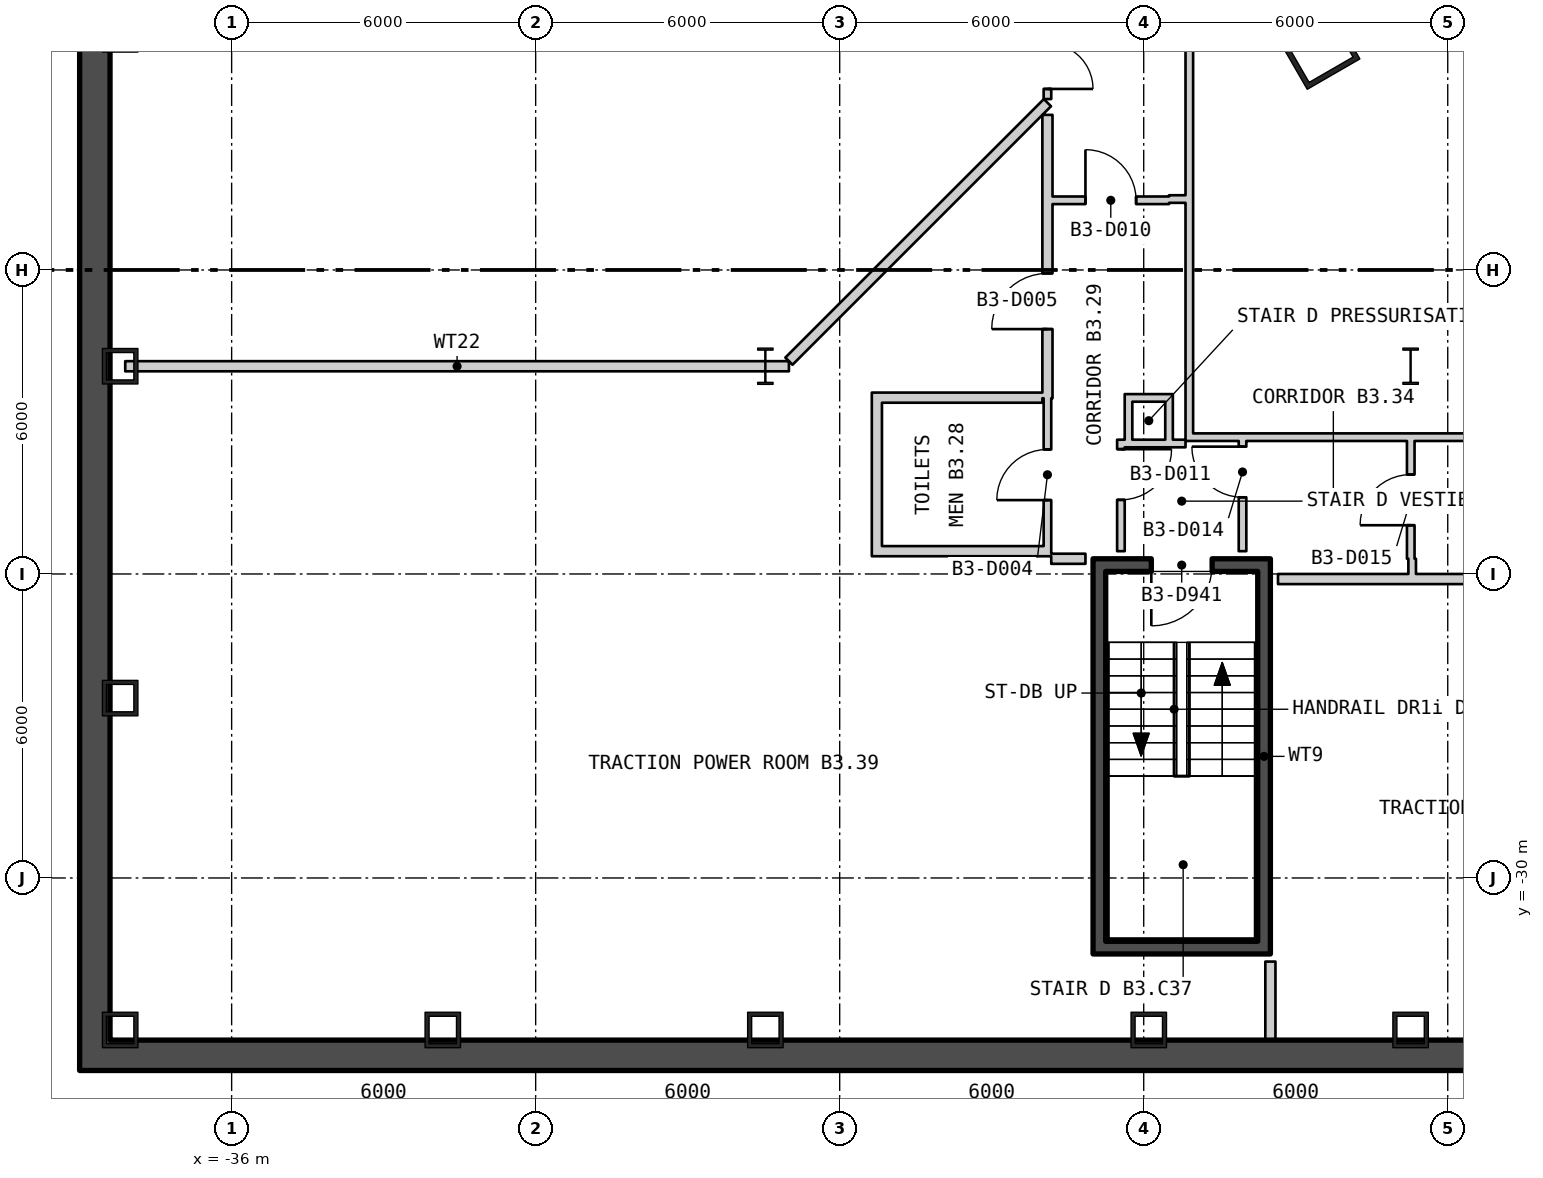
"""IFC4 building model, lengths in metres.
Left out: names, types, materials, properties, quantities, classifications, styles, units other than length and angle.
Written with IfcOpenShell. Run it as: python <this file> out.ifc"""

import sys

from ifc_helpers import new_model, si_unit, direction, frame, frame_2d, origin, origin_2d, place, context, subcontext, project, spatial, rectangle, hollow_rectangle, i_section, extrude, element, fill, save


model = new_model("IFC4")
c1 = context("Model", 3, precision=1e-05, world=origin(), true_north=direction((0.0, 1.0)))
c2 = subcontext(c1, "Body", "Model", "MODEL_VIEW")
j1 = project(units=[si_unit("LENGTHUNIT", "METRE"), si_unit("PLANEANGLEUNIT", "RADIAN")], contexts=[c1])
p1 = place(None, origin())
s1 = spatial("IfcSite", under=j1, at=p1, CompositionType="ELEMENT")
p2 = place(p1, origin())
s2 = spatial("IfcBuilding", under=s1, at=p2, CompositionType="ELEMENT")
p3 = place(p2, frame((0.0, 0.0, -16.8)))
s3 = spatial("IfcBuildingStorey", under=s2, at=p3, CompositionType="ELEMENT", Elevation=-16.8)
p4 = place(p3, frame((-14.553, -13.615, 0.0), z_axis=(0.0, 0.0, 1.0), x_axis=(0.5, -0.866025403784, 0.0)))
e1 = element("IfcColumn", 1, at=p4, inside=s3, PredefinedType="COLUMN", context=c2, shape_type="SweptSolid", body=[
    extrude(hollow_rectangle(XDim=1.2, YDim=1.2, WallThickness=0.1, at=origin_2d()), origin(), (0.0, 0.0, 1.0), 5.4),
])
for number, where, z_axis, x_axis in (
    (2, (-38.2, -19.9, 0.0), (0.0, 0.0, 1.0), (0.0, -1.0, 0.0)),
    (3, (-38.2, -26.45, 0.0), (0.0, 0.0, 1.0), (0.0, -1.0, 0.0)),
    (4, (-38.2, -33.0, 0.0), (0.0, 0.0, 1.0), (1.0, 0.0, 0.0)),
    (5, (-31.833, -33.0, 0.0), (0.0, 0.0, 1.0), (1.0, 0.0, 0.0)),
    (6, (-25.467, -33.0, 0.0), (0.0, 0.0, 1.0), (1.0, 0.0, 0.0)),
    (7, (-17.9, -33.0, 0.0), (0.0, 0.0, 1.0), (1.0, 0.0, 0.0)),
    (8, (-12.733, -33.0, 0.0), (0.0, 0.0, 1.0), (1.0, 0.0, 0.0)),
):
    element("IfcColumn", number, at=place(p3, frame(where, z_axis=z_axis, x_axis=x_axis)), inside=s3, PredefinedType="COLUMN", context=c2, shape_type="SweptSolid", body=[
        extrude(hollow_rectangle(XDim=0.7, YDim=0.7, WallThickness=0.08, at=origin_2d()), origin(), (0.0, 0.0, 1.0), 5.4),
    ])
for number, where, z_axis, x_axis in (
    (9, (-25.467, -19.9, 0.0), (0.0, 0.0, 1.0), (1.0, 0.0, 0.0)),
    (10, (-12.733, -19.9, 0.0), (0.0, 0.0, 1.0), (1.0, 0.0, 0.0)),
):
    element("IfcColumn", number, at=place(p3, frame(where, z_axis=z_axis, x_axis=x_axis)), inside=s3, PredefinedType="COLUMN", context=c2, shape_type="SweptSolid", body=[
        extrude(i_section(OverallWidth=0.304, OverallDepth=0.716, WebThickness=0.021, FlangeThickness=0.04, at=origin_2d()), origin(), (0.0, 0.0, 1.0), 5.4),
    ])
p5 = place(p3, frame((-39.0, -33.5, -0.4), z_axis=(0.0, 0.0, 1.0), x_axis=(1.0, 0.0, 0.0)))
e11 = element("IfcWall", 11, at=p5, inside=s3, PredefinedType="STANDARD", context=c2, shape_type="SweptSolid", body=[
    extrude(rectangle(XDim=78.0, YDim=0.6, at=frame_2d((39.0, 0.0))), origin(), (0.0, 0.0, 1.0), 5.4),
])
p6 = place(p3, frame((-38.7, -33.2, -0.4), z_axis=(0.0, 0.0, 1.0), x_axis=(0.0, 1.0, 0.0)))
e12 = element("IfcWall", 12, at=p6, inside=s3, PredefinedType="STANDARD", context=c2, shape_type="SweptSolid", body=[
    extrude(rectangle(XDim=52.8, YDim=0.6, at=frame_2d((26.4, 0.0))), origin(), (0.0, 0.0, 1.0), 5.4),
])
for number, where, z_axis, x_axis in (
    (13, (-18.875, -31.25, 0.0), (0.0, 0.0, 1.0), (0.0, 1.0, 0.0)),
    (14, (-15.625, -31.25, 0.0), (0.0, 0.0, 1.0), (0.0, 1.0, 0.0)),
):
    element("IfcWall", number, at=place(p3, frame(where, z_axis=z_axis, x_axis=x_axis)), inside=s3, PredefinedType="SHEAR", context=c2, shape_type="SweptSolid", body=[
        extrude(rectangle(XDim=7.3, YDim=0.25, at=frame_2d((3.65, 0.0))), origin(), (0.0, 0.0, 1.0), 4.95),
    ])
p7 = place(p3, frame((-19.0, -31.375, 0.0), z_axis=(0.0, 0.0, 1.0), x_axis=(1.0, 0.0, 0.0)))
e15 = element("IfcWall", 15, at=p7, inside=s3, PredefinedType="SHEAR", context=c2, shape_type="SweptSolid", body=[
    extrude(rectangle(XDim=3.5, YDim=0.25, at=frame_2d((1.75, 0.0))), origin(), (0.0, 0.0, 1.0), 4.95),
])
p8 = place(p3, frame((-19.0, -23.825, 0.0), z_axis=(0.0, 0.0, 1.0), x_axis=(1.0, 0.0, 0.0)))
e16 = element("IfcWall", 16, at=p8, inside=s3, PredefinedType="SHEAR", context=c2, shape_type="SweptSolid", body=[
    extrude(rectangle(XDim=3.5, YDim=0.25, at=frame_2d((1.75, 0.0))), origin(), (0.0, 0.0, 1.0), 4.95),
])
p9 = place(p8, frame((1.15, 0.0, 0.0)))
e17 = element("IfcOpeningElement", 17, at=p9, cuts=e16, PredefinedType="OPENING", context=c2, shape_type="SweptSolid", body=[
    extrude(rectangle(XDim=1.2, YDim=2.1, at=frame_2d((0.6, 1.05))), frame((0.0, 0.135, 0.0), z_axis=(0.0, -1.0, 0.0), x_axis=(1.0, 0.0, 0.0)), (0.0, 0.0, 1.0), 0.27),
])
p10 = place(p3, frame((-38.1, -19.9, 0.0), z_axis=(0.0, 0.0, 1.0), x_axis=(1.0, 0.0, 0.0)))
e18 = element("IfcWall", 18, at=p10, inside=s3, PredefinedType="PARTITIONING", context=c2, shape_type="SweptSolid", body=[
    extrude(rectangle(XDim=13.098, YDim=0.2, at=frame_2d((6.549, 0.0))), origin(), (0.0, 0.0, 1.0), 4.95),
])
p11 = place(p3, frame((-25.002, -19.8, 0.0), z_axis=(0.0, 0.0, 1.0), x_axis=(0.707106781187, 0.707106781187, 0.0)))
e19 = element("IfcWall", 19, at=p11, inside=s3, PredefinedType="PARTITIONING", context=c2, shape_type="SweptSolid", body=[
    extrude(rectangle(XDim=7.215, YDim=0.2, at=frame_2d((3.608, 0.0))), origin(), (0.0, 0.0, 1.0), 4.95),
])
p12 = place(p3, frame((-23.366, -23.55, 0.0), z_axis=(0.0, 0.0, 1.0), x_axis=(1.0, 0.0, 0.0)))
e20 = element("IfcWall", 20, at=p12, inside=s3, PredefinedType="PARTITIONING", context=c2, shape_type="SweptSolid", body=[
    extrude(rectangle(XDim=3.541, YDim=0.2, at=frame_2d((1.77, 0.0))), origin(), (0.0, 0.0, 1.0), 4.95),
])
p13 = place(p3, frame((-23.366, -20.52, 0.0), z_axis=(0.0, 0.0, 1.0), x_axis=(1.0, 0.0, 0.0)))
e21 = element("IfcWall", 21, at=p13, inside=s3, PredefinedType="PARTITIONING", context=c2, shape_type="SweptSolid", body=[
    extrude(rectangle(XDim=3.366, YDim=0.2, at=frame_2d((1.683, 0.0))), origin(), (0.0, 0.0, 1.0), 4.95),
])
p14 = place(p3, frame((-23.266, -23.45, 0.0), z_axis=(0.0, 0.0, 1.0), x_axis=(0.0, 1.0, 0.0)))
e22 = element("IfcWall", 22, at=p14, inside=s3, PredefinedType="PARTITIONING", context=c2, shape_type="SweptSolid", body=[
    extrude(rectangle(XDim=2.83, YDim=0.2, at=frame_2d((1.415, 0.0))), origin(), (0.0, 0.0, 1.0), 4.95),
])
p15 = place(p3, frame((-19.9, -23.45, 0.0), z_axis=(0.0, 0.0, 1.0), x_axis=(0.0, 1.0, 0.0)))
e23 = element("IfcWall", 23, at=p15, inside=s3, PredefinedType="PARTITIONING", context=c2, shape_type="SweptSolid", body=[
    extrude(rectangle(XDim=2.918, YDim=0.15, at=frame_2d((1.459, 0.0))), origin(), (0.0, 0.0, 1.0), 4.95),
])
p16 = place(p15, frame((0.908, 0.0, 0.0)))
e24 = element("IfcOpeningElement", 24, at=p16, cuts=e23, PredefinedType="OPENING", context=c2, shape_type="SweptSolid", body=[
    extrude(rectangle(XDim=1.0, YDim=2.1, at=frame_2d((0.5, 1.05))), frame((0.0, 0.085, 0.0), z_axis=(0.0, -1.0, 0.0), x_axis=(1.0, 0.0, 0.0)), (0.0, 0.0, 1.0), 0.17),
])
p17 = place(p3, frame((-19.9, -20.532, 0.0), z_axis=(0.0, 0.0, 1.0), x_axis=(0.0, 1.0, 0.0)))
e25 = element("IfcWall", 25, at=p17, inside=s3, PredefinedType="PARTITIONING", context=c2, shape_type="SweptSolid", body=[
    extrude(rectangle(XDim=5.593, YDim=0.2, at=frame_2d((2.796, 0.0))), origin(), (0.0, 0.0, 1.0), 4.95),
])
p18 = place(p17, frame((1.365, 0.0, 0.0)))
e26 = element("IfcOpeningElement", 26, at=p18, cuts=e25, PredefinedType="OPENING", context=c2, shape_type="SweptSolid", body=[
    extrude(rectangle(XDim=1.1, YDim=2.1, at=frame_2d((0.55, 1.05))), frame((0.0, 0.11, 0.0), z_axis=(0.0, -1.0, 0.0), x_axis=(1.0, 0.0, 0.0)), (0.0, 0.0, 1.0), 0.22),
])
p19 = place(p3, frame((-19.9, -14.627, 0.0), z_axis=(0.0, 0.0, 1.0), x_axis=(0.0, 1.0, 0.0)))
e27 = element("IfcWall", 27, at=p19, inside=s3, PredefinedType="PARTITIONING", context=c2, shape_type="SweptSolid", body=[
    extrude(rectangle(XDim=12.039, YDim=0.15, at=frame_2d((6.019, 0.0))), origin(), (0.0, 0.0, 1.0), 4.95),
])
p20 = place(p19, frame((0.2, 0.0, 0.0)))
e28 = element("IfcOpeningElement", 28, at=p20, cuts=e27, PredefinedType="OPENING", context=c2, shape_type="SweptSolid", body=[
    extrude(rectangle(XDim=1.8, YDim=2.1, at=frame_2d((0.9, 1.05))), frame((0.0, 0.085, 0.0), z_axis=(0.0, -1.0, 0.0), x_axis=(1.0, 0.0, 0.0)), (0.0, 0.0, 1.0), 0.17),
])
p21 = place(p19, frame((5.308, 0.0, 0.0)))
e29 = element("IfcOpeningElement", 29, at=p21, cuts=e27, PredefinedType="OPENING", context=c2, shape_type="SweptSolid", body=[
    extrude(rectangle(XDim=1.8, YDim=2.1, at=frame_2d((0.9, 1.05))), frame((0.0, 0.085, 0.0), z_axis=(0.0, -1.0, 0.0), x_axis=(1.0, 0.0, 0.0)), (0.0, 0.0, 1.0), 0.17),
])
p22 = place(p3, frame((-19.825, -23.7, 0.0), z_axis=(0.0, 0.0, 1.0), x_axis=(1.0, 0.0, 0.0)))
e30 = element("IfcWall", 30, at=p22, inside=s3, PredefinedType="PARTITIONING", context=c2, shape_type="SweptSolid", body=[
    extrude(rectangle(XDim=0.675, YDim=0.2, at=frame_2d((0.338, 0.0))), origin(), (0.0, 0.0, 1.0), 4.95),
])
p23 = place(p3, frame((-19.8, -16.625, 0.0), z_axis=(0.0, 0.0, 1.0), x_axis=(1.0, 0.0, 0.0)))
e31 = element("IfcWall", 31, at=p23, inside=s3, PredefinedType="PARTITIONING", context=c2, shape_type="SweptSolid", body=[
    extrude(rectangle(XDim=2.3, YDim=0.15, at=frame_2d((1.15, 0.0))), origin(), (0.0, 0.0, 1.0), 4.95),
])
p24 = place(p23, frame((0.65, 0.0, 0.0)))
e32 = element("IfcOpeningElement", 32, at=p24, cuts=e31, PredefinedType="OPENING", context=c2, shape_type="SweptSolid", body=[
    extrude(rectangle(XDim=1.0, YDim=2.1, at=frame_2d((0.5, 1.05))), frame((0.0, 0.085, 0.0), z_axis=(0.0, -1.0, 0.0), x_axis=(1.0, 0.0, 0.0)), (0.0, 0.0, 1.0), 0.17),
])
p25 = place(p3, frame((-18.45, -23.55, 0.0), z_axis=(0.0, 0.0, 1.0), x_axis=(0.0, 1.0, 0.0)))
e33 = element("IfcWall", 33, at=p25, inside=s3, PredefinedType="PARTITIONING", context=c2, shape_type="SweptSolid", body=[
    extrude(rectangle(XDim=2.2, YDim=0.15, at=frame_2d((1.1, 0.0))), origin(), (0.0, 0.0, 1.0), 4.95),
])
p26 = place(p25, frame((1.013, 0.0, 0.0)))
e34 = element("IfcOpeningElement", 34, at=p26, cuts=e33, PredefinedType="OPENING", context=c2, shape_type="SweptSolid", body=[
    extrude(rectangle(XDim=1.0, YDim=2.1, at=frame_2d((0.5, 1.05))), frame((0.0, 0.085, 0.0), z_axis=(0.0, -1.0, 0.0), x_axis=(1.0, 0.0, 0.0)), (0.0, 0.0, 1.0), 0.17),
])
p27 = place(p3, frame((-18.3, -21.5, 0.0), z_axis=(0.0, 0.0, 1.0), x_axis=(0.0, 1.0, 0.0)))
e35 = element("IfcWall", 35, at=p27, inside=s3, PredefinedType="PARTITIONING", context=c2, shape_type="SweptSolid", body=[
    extrude(rectangle(XDim=1.05, YDim=0.15, at=frame_2d((0.525, 0.0))), origin(), (0.0, 0.0, 1.0), 4.95),
])
for number, where, z_axis, x_axis in (
    (36, (-18.225, -21.425, 0.0), (0.0, 0.0, 1.0), (1.0, 0.0, 0.0)),
    (37, (-18.225, -20.525, 0.0), (0.0, 0.0, 1.0), (1.0, 0.0, 0.0)),
):
    element("IfcWall", number, at=place(p3, frame(where, z_axis=z_axis, x_axis=x_axis)), inside=s3, PredefinedType="PARTITIONING", context=c2, shape_type="SweptSolid", body=[
        extrude(rectangle(XDim=0.65, YDim=0.15, at=frame_2d((0.325, 0.0))), origin(), (0.0, 0.0, 1.0), 4.95),
    ])
p28 = place(p3, frame((-17.5, -21.5, 0.0), z_axis=(0.0, 0.0, 1.0), x_axis=(0.0, 1.0, 0.0)))
e38 = element("IfcWall", 38, at=p28, inside=s3, PredefinedType="PARTITIONING", context=c2, shape_type="SweptSolid", body=[
    extrude(rectangle(XDim=1.05, YDim=0.15, at=frame_2d((0.525, 0.0))), origin(), (0.0, 0.0, 1.0), 4.95),
])
p29 = place(p3, frame((-17.5, -16.6, 0.0), z_axis=(0.0, 0.0, 1.0), x_axis=(1.0, 0.0, 0.0)))
e39 = element("IfcWall", 39, at=p29, inside=s3, PredefinedType="PARTITIONING", context=c2, shape_type="SweptSolid", body=[
    extrude(rectangle(XDim=0.325, YDim=0.15, at=frame_2d((0.163, 0.0))), origin(), (0.0, 0.0, 1.0), 4.95),
])
p30 = place(p3, frame((-17.425, -21.425, 0.0), z_axis=(0.0, 0.0, 1.0), x_axis=(1.0, 0.0, 0.0)))
e40 = element("IfcWall", 40, at=p30, inside=s3, PredefinedType="PARTITIONING", context=c2, shape_type="SweptSolid", body=[
    extrude(rectangle(XDim=0.25, YDim=0.15, at=frame_2d((0.125, 0.0))), origin(), (0.0, 0.0, 1.0), 4.95),
])
p31 = place(p3, frame((-17.175, -21.3, 0.0), z_axis=(0.0, 0.0, 1.0), x_axis=(1.0, 0.0, 0.0)))
e41 = element("IfcWall", 41, at=p31, inside=s3, PredefinedType="PARTITIONING", context=c2, shape_type="SweptSolid", body=[
    extrude(rectangle(XDim=15.475, YDim=0.15, at=frame_2d((7.737, 0.0))), origin(), (0.0, 0.0, 1.0), 4.95),
])
p32 = place(p31, frame((8.393, 0.0, 0.0)))
e42 = element("IfcOpeningElement", 42, at=p32, cuts=e41, PredefinedType="OPENING", context=c2, shape_type="SweptSolid", body=[
    extrude(rectangle(XDim=1.8, YDim=2.1, at=frame_2d((0.9, 1.05))), frame((0.0, 0.085, 0.0), z_axis=(0.0, -1.0, 0.0), x_axis=(1.0, 0.0, 0.0)), (0.0, 0.0, 1.0), 0.17),
])
p33 = place(p3, frame((-17.1, -21.225, 0.0), z_axis=(0.0, 0.0, 1.0), x_axis=(0.0, 1.0, 0.0)))
e43 = element("IfcWall", 43, at=p33, inside=s3, PredefinedType="PARTITIONING", context=c2, shape_type="SweptSolid", body=[
    extrude(rectangle(XDim=14.326, YDim=0.15, at=frame_2d((7.163, 0.0))), origin(), (0.0, 0.0, 1.0), 4.95),
])
p34 = place(p3, frame((-16.05, -23.55, 0.0), z_axis=(0.0, 0.0, 1.0), x_axis=(0.0, 1.0, 0.0)))
e44 = element("IfcWall", 44, at=p34, inside=s3, PredefinedType="PARTITIONING", context=c2, shape_type="SweptSolid", body=[
    extrude(rectangle(XDim=2.175, YDim=0.15, at=frame_2d((1.087, 0.0))), origin(), (0.0, 0.0, 1.0), 4.95),
])
p35 = place(p34, frame((1.063, 0.0, 0.0)))
e45 = element("IfcOpeningElement", 45, at=p35, cuts=e44, PredefinedType="OPENING", context=c2, shape_type="SweptSolid", body=[
    extrude(rectangle(XDim=1.0, YDim=2.1, at=frame_2d((0.5, 1.05))), frame((0.0, 0.085, 0.0), z_axis=(0.0, -1.0, 0.0), x_axis=(1.0, 0.0, 0.0)), (0.0, 0.0, 1.0), 0.17),
])
p36 = place(p3, frame((-15.5, -33.35, 0.0), z_axis=(0.0, 0.0, 1.0), x_axis=(0.0, 1.0, 0.0)))
e46 = element("IfcWall", 46, at=p36, inside=s3, PredefinedType="PARTITIONING", context=c2, shape_type="SweptSolid", body=[
    extrude(rectangle(XDim=1.7, YDim=0.2, at=frame_2d((0.85, 0.0))), origin(), (0.0, 0.0, 1.0), 4.95),
])
p37 = place(p3, frame((-15.35, -24.1, 0.0), z_axis=(0.0, 0.0, 1.0), x_axis=(1.0, 0.0, 0.0)))
e47 = element("IfcWall", 47, at=p37, inside=s3, PredefinedType="PARTITIONING", context=c2, shape_type="SweptSolid", body=[
    extrude(rectangle(XDim=15.539, YDim=0.2, at=frame_2d((7.769, 0.0))), origin(), (0.0, 0.0, 1.0), 4.95),
])
p38 = place(p3, frame((-12.73, -23.7, 0.0), z_axis=(0.0, 0.0, 1.0), x_axis=(0.0, 1.0, 0.0)))
e48 = element("IfcWall", 48, at=p38, inside=s3, PredefinedType="PARTITIONING", context=c2, shape_type="SweptSolid", body=[
    extrude(rectangle(XDim=2.325, YDim=0.15, at=frame_2d((1.163, 0.0))), origin(), (0.0, 0.0, 1.0), 4.95),
])
p39 = place(p38, frame((0.662, 0.0, 0.0)))
e49 = element("IfcOpeningElement", 49, at=p39, cuts=e48, PredefinedType="OPENING", context=c2, shape_type="SweptSolid", body=[
    extrude(rectangle(XDim=1.0, YDim=2.1, at=frame_2d((0.5, 1.05))), frame((0.0, 0.085, 0.0), z_axis=(0.0, -1.0, 0.0), x_axis=(1.0, 0.0, 0.0)), (0.0, 0.0, 1.0), 0.17),
])
p40 = place(p3, frame((-12.702, -24.0, 0.0), z_axis=(0.0, 0.0, 1.0), x_axis=(0.0, 1.0, 0.0)))
e50 = element("IfcWall", 50, at=p40, inside=s3, PredefinedType="PARTITIONING", context=c2, shape_type="SweptSolid", body=[
    extrude(rectangle(XDim=0.3, YDim=0.15, at=frame_2d((0.15, 0.0))), origin(), (0.0, 0.0, 1.0), 4.95),
])
p41 = place(p9, origin())
e51 = element("IfcDoor", 51, at=p41, inside=s3, OperationType="SINGLE_SWING_LEFT", PredefinedType="DOOR", context=c2, shape_type="SweptSolid", body=[
    extrude(rectangle(XDim=1.2, YDim=2.1, at=frame_2d((0.6, 1.05))), frame((0.0, 0.025, 0.0), z_axis=(0.0, -1.0, 0.0), x_axis=(1.0, 0.0, 0.0)), (0.0, 0.0, 1.0), 0.05),
])
fill(e17, e51)
p42 = place(p16, origin())
e52 = element("IfcDoor", 52, at=p42, inside=s3, OperationType="SINGLE_SWING_RIGHT", PredefinedType="DOOR", context=c2, shape_type="SweptSolid", body=[
    extrude(rectangle(XDim=1.0, YDim=2.1, at=frame_2d((0.5, 1.05))), frame((0.0, 0.025, 0.0), z_axis=(0.0, -1.0, 0.0), x_axis=(1.0, 0.0, 0.0)), (0.0, 0.0, 1.0), 0.05),
])
fill(e24, e52)
p43 = place(p18, origin())
e53 = element("IfcDoor", 53, at=p43, inside=s3, OperationType="SINGLE_SWING_RIGHT", PredefinedType="DOOR", context=c2, shape_type="SweptSolid", body=[
    extrude(rectangle(XDim=1.1, YDim=2.1, at=frame_2d((0.55, 1.05))), frame((0.0, 0.025, 0.0), z_axis=(0.0, -1.0, 0.0), x_axis=(1.0, 0.0, 0.0)), (0.0, 0.0, 1.0), 0.05),
])
fill(e26, e53)
p44 = place(p20, origin())
e54 = element("IfcDoor", 54, at=p44, inside=s3, OperationType="DOUBLE_DOOR_SINGLE_SWING", PredefinedType="DOOR", context=c2, shape_type="SweptSolid", body=[
    extrude(rectangle(XDim=1.8, YDim=2.1, at=frame_2d((0.9, 1.05))), frame((0.0, 0.025, 0.0), z_axis=(0.0, -1.0, 0.0), x_axis=(1.0, 0.0, 0.0)), (0.0, 0.0, 1.0), 0.05),
])
fill(e28, e54)
p45 = place(p24, origin())
e55 = element("IfcDoor", 55, at=p45, inside=s3, OperationType="SINGLE_SWING_RIGHT", PredefinedType="DOOR", context=c2, shape_type="SweptSolid", body=[
    extrude(rectangle(XDim=1.0, YDim=2.1, at=frame_2d((0.5, 1.05))), frame((0.0, 0.025, 0.0), z_axis=(0.0, -1.0, 0.0), x_axis=(1.0, 0.0, 0.0)), (0.0, 0.0, 1.0), 0.05),
])
fill(e32, e55)
p46 = place(p26, origin())
e56 = element("IfcDoor", 56, at=p46, inside=s3, OperationType="SINGLE_SWING_RIGHT", PredefinedType="DOOR", context=c2, shape_type="SweptSolid", body=[
    extrude(rectangle(XDim=1.0, YDim=2.1, at=frame_2d((0.5, 1.05))), frame((0.0, 0.025, 0.0), z_axis=(0.0, -1.0, 0.0), x_axis=(1.0, 0.0, 0.0)), (0.0, 0.0, 1.0), 0.05),
])
fill(e34, e56)
p47 = place(p35, origin())
e57 = element("IfcDoor", 57, at=p47, inside=s3, OperationType="SINGLE_SWING_LEFT", PredefinedType="DOOR", context=c2, shape_type="SweptSolid", body=[
    extrude(rectangle(XDim=1.0, YDim=2.1, at=frame_2d((0.5, 1.05))), frame((0.0, 0.025, 0.0), z_axis=(0.0, -1.0, 0.0), x_axis=(1.0, 0.0, 0.0)), (0.0, 0.0, 1.0), 0.05),
])
fill(e45, e57)
p48 = place(p39, origin())
e58 = element("IfcDoor", 58, at=p48, inside=s3, OperationType="SINGLE_SWING_RIGHT", PredefinedType="DOOR", context=c2, shape_type="SweptSolid", body=[
    extrude(rectangle(XDim=1.0, YDim=2.1, at=frame_2d((0.5, 1.05))), frame((0.0, 0.025, 0.0), z_axis=(0.0, -1.0, 0.0), x_axis=(1.0, 0.0, 0.0)), (0.0, 0.0, 1.0), 0.05),
])
fill(e49, e58)
save(model, sys.argv[1])
